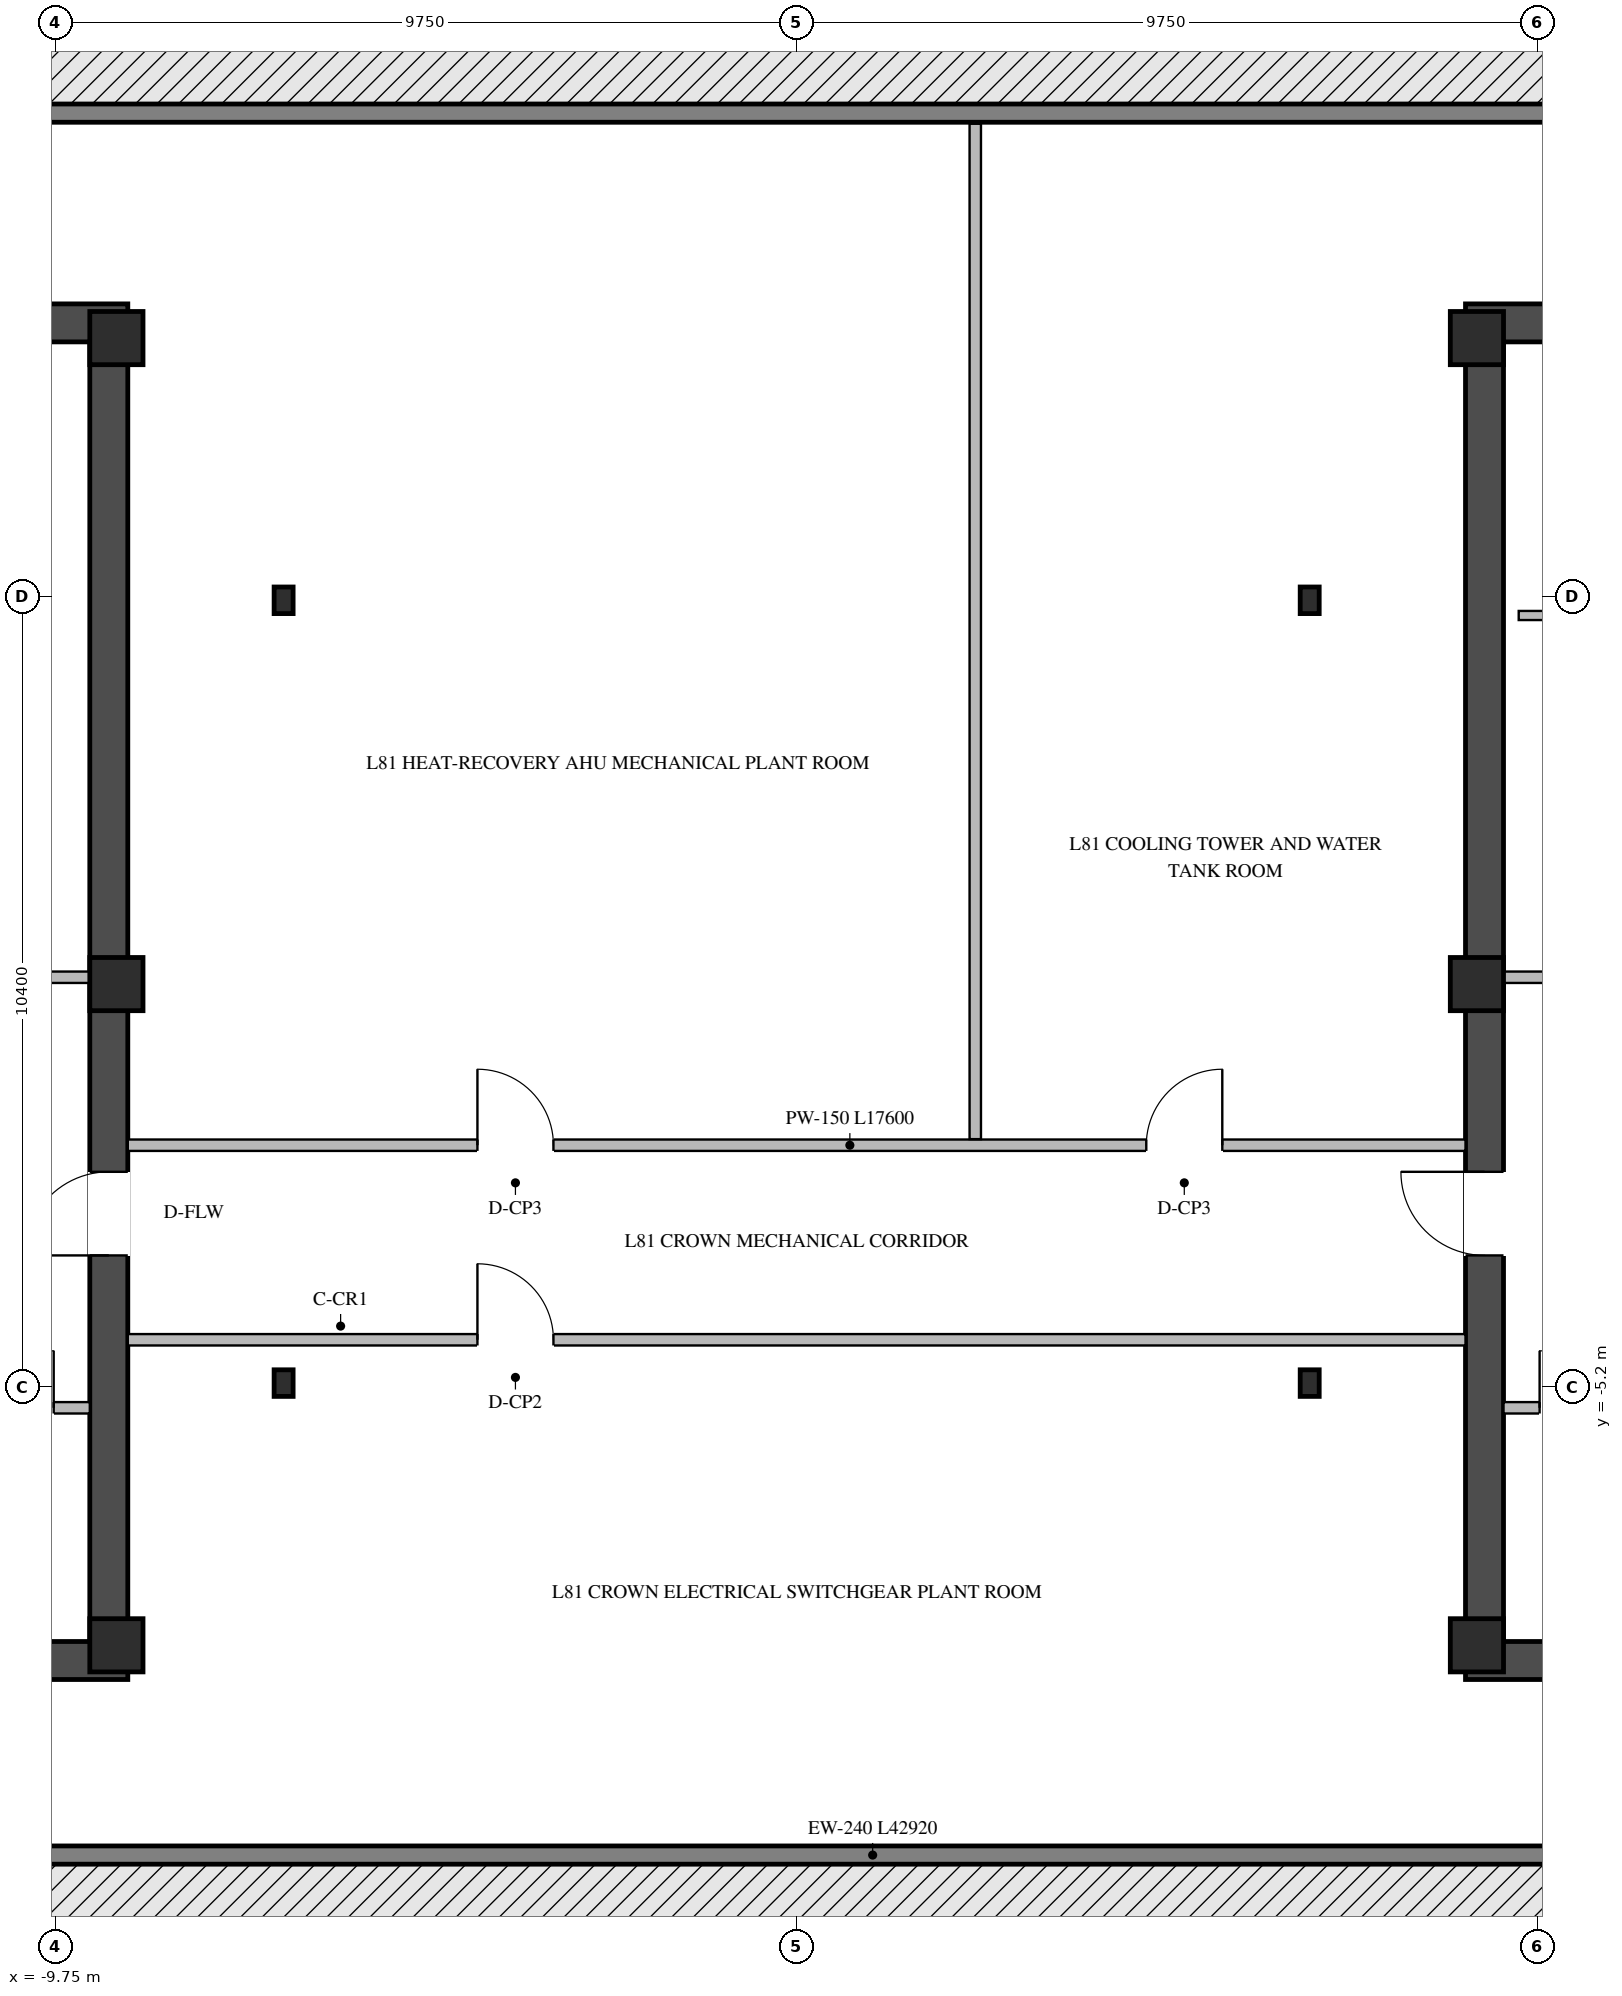
"""IFC4 building model, lengths in metres.
Left out: names, types, materials, properties, quantities, classifications, styles, units other than length and angle.
Written with IfcOpenShell. Run it as: python <this file> out.ifc"""

import sys

from ifc_helpers import new_model, si_unit, direction, frame, frame_2d, origin, origin_2d, place, context, subcontext, project, spatial, rectangle, i_section, extrude, element, fill, save


model = new_model("IFC4")
c1 = context("Model", 3, precision=1e-05, world=origin(), true_north=direction((0.0, 1.0)))
c2 = subcontext(c1, "Body", "Model", "MODEL_VIEW")
j1 = project(units=[si_unit("LENGTHUNIT", "METRE"), si_unit("PLANEANGLEUNIT", "RADIAN")], contexts=[c1])
p1 = place(None, origin())
s1 = spatial("IfcSite", under=j1, at=p1, CompositionType="ELEMENT")
p2 = place(p1, origin())
s2 = spatial("IfcBuilding", under=s1, at=p2, CompositionType="ELEMENT")
p3 = place(p2, frame((0.0, 0.0, 297.75)))
s3 = spatial("IfcBuildingStorey", under=s2, at=p3, CompositionType="ELEMENT", Elevation=297.75)
for number, where, z_axis, x_axis in (
    (1, (-19.05, -8.8, 0.0), (0.0, 0.0, 1.0), (1.0, 0.0, 0.0)),
    (2, (-19.05, 8.8, 0.0), (0.0, 0.0, 1.0), (1.0, 0.0, 0.0)),
):
    element("IfcWall", number, at=place(p3, frame(where, z_axis=z_axis, x_axis=x_axis)), inside=s3, PredefinedType="SHEAR", context=c2, shape_type="SweptSolid", body=[
        extrude(rectangle(XDim=10.25, YDim=0.5, at=frame_2d((5.125, 0.0))), origin(), (0.0, 0.0, 1.0), 3.35),
    ])
p4 = place(p3, frame((-9.05, -8.55, 0.0), z_axis=(0.0, 0.0, 1.0), x_axis=(0.0, 1.0, 0.0)))
e3 = element("IfcWall", 3, at=p4, inside=s3, PredefinedType="SHEAR", context=c2, shape_type="SweptSolid", body=[
    extrude(rectangle(XDim=17.1, YDim=0.5, at=frame_2d((8.55, 0.0))), origin(), (0.0, 0.0, 1.0), 3.35),
])
p5 = place(p4, frame((5.08, 0.0, 0.0)))
e4 = element("IfcOpeningElement", 4, at=p5, cuts=e3, PredefinedType="OPENING", context=c2, shape_type="SweptSolid", body=[
    extrude(rectangle(XDim=1.1, YDim=2.08, at=frame_2d((0.55, 1.04))), frame((0.0, 0.26, 0.0), z_axis=(0.0, -1.0, 0.0), x_axis=(1.0, 0.0, 0.0)), (0.0, 0.0, 1.0), 0.52),
])
for number, where, z_axis, x_axis in (
    (5, (8.8, -8.8, 0.0), (0.0, 0.0, 1.0), (1.0, 0.0, 0.0)),
    (6, (8.8, 8.8, 0.0), (0.0, 0.0, 1.0), (1.0, 0.0, 0.0)),
):
    element("IfcWall", number, at=place(p3, frame(where, z_axis=z_axis, x_axis=x_axis)), inside=s3, PredefinedType="SHEAR", context=c2, shape_type="SweptSolid", body=[
        extrude(rectangle(XDim=10.25, YDim=0.5, at=frame_2d((5.125, 0.0))), origin(), (0.0, 0.0, 1.0), 3.35),
    ])
p6 = place(p3, frame((9.05, -8.55, 0.0), z_axis=(0.0, 0.0, 1.0), x_axis=(0.0, 1.0, 0.0)))
e7 = element("IfcWall", 7, at=p6, inside=s3, PredefinedType="SHEAR", context=c2, shape_type="SweptSolid", body=[
    extrude(rectangle(XDim=17.1, YDim=0.5, at=frame_2d((8.55, 0.0))), origin(), (0.0, 0.0, 1.0), 3.35),
])
p7 = place(p6, frame((5.08, 0.0, 0.0)))
e8 = element("IfcOpeningElement", 8, at=p7, cuts=e7, PredefinedType="OPENING", context=c2, shape_type="SweptSolid", body=[
    extrude(rectangle(XDim=1.1, YDim=2.08, at=frame_2d((0.55, 1.04))), frame((0.0, 0.26, 0.0), z_axis=(0.0, -1.0, 0.0), x_axis=(1.0, 0.0, 0.0)), (0.0, 0.0, 1.0), 0.52),
])
for number, where, z_axis, x_axis in (
    (9, (-8.95, -8.6, 0.0), (0.0, 0.0, 1.0), (1.0, 0.0, 0.0)),
    (10, (-8.95, 0.1, 0.0), (0.0, 0.0, 1.0), (1.0, 0.0, 0.0)),
    (11, (-8.95, 8.6, 0.0), (0.0, 0.0, 1.0), (1.0, 0.0, 0.0)),
    (12, (8.95, -8.6, 0.0), (0.0, 0.0, 1.0), (1.0, 0.0, 0.0)),
    (13, (8.95, 0.1, 0.0), (0.0, 0.0, 1.0), (1.0, 0.0, 0.0)),
    (14, (8.95, 8.6, 0.0), (0.0, 0.0, 1.0), (1.0, 0.0, 0.0)),
):
    element("IfcColumn", number, at=place(p3, frame(where, z_axis=z_axis, x_axis=x_axis)), inside=s3, PredefinedType="COLUMN", context=c2, shape_type="SweptSolid", body=[
        extrude(rectangle(XDim=0.7, YDim=0.7, at=origin_2d()), origin(), (0.0, 0.0, 1.0), 3.6),
    ])
for number, where, z_axis, x_axis in (
    (15, (-6.75, -5.15, 0.0), (0.0, 0.0, 1.0), (1.0, 0.0, 0.0)),
    (16, (-6.75, 5.15, 0.0), (0.0, 0.0, 1.0), (1.0, 0.0, 0.0)),
    (17, (6.75, -5.15, 0.0), (0.0, 0.0, 1.0), (1.0, 0.0, 0.0)),
    (18, (6.75, 5.15, 0.0), (0.0, 0.0, 1.0), (1.0, 0.0, 0.0)),
):
    element("IfcColumn", number, at=place(p3, frame(where, z_axis=z_axis, x_axis=x_axis)), inside=s3, PredefinedType="COLUMN", context=c2, shape_type="SweptSolid", body=[
        extrude(i_section(OverallWidth=0.25, OverallDepth=0.35, WebThickness=0.01, FlangeThickness=0.012, at=origin_2d()), origin(), (0.0, 0.0, 1.0), 3.6),
    ])
for number, where, z_axis, x_axis in (
    (19, (-20.46, -11.36, 0.0), (0.0, 0.0, 1.0), (1.0, 0.0, 0.0)),
    (20, (22.46, 11.56, 0.0), (0.0, 0.0, 1.0), (-1.0, 0.0, 0.0)),
):
    element("IfcWall", number, at=place(p3, frame(where, z_axis=z_axis, x_axis=x_axis)), inside=s3, PredefinedType="STANDARD", context=c2, shape_type="SweptSolid", body=[
        extrude(rectangle(XDim=42.92, YDim=0.24, at=frame_2d((21.46, 0.0))), origin(), (0.0, 0.0, 1.0), 3.33),
    ])
p8 = place(p3, frame((-12.895, -5.475, 0.0), z_axis=(0.0, 0.0, 1.0), x_axis=(1.0, 0.0, 0.0)))
e21 = element("IfcWall", 21, at=p8, inside=s3, PredefinedType="STANDARD", context=c2, shape_type="SweptSolid", body=[
    extrude(rectangle(XDim=3.595, YDim=0.15, at=frame_2d((1.797, 0.0))), origin(), (0.0, 0.0, 1.0), 3.33),
])
p9 = place(p8, frame((0.42, 0.0, 0.0)))
e22 = element("IfcOpeningElement", 22, at=p9, cuts=e21, PredefinedType="OPENING", context=c2, shape_type="SweptSolid", body=[
    extrude(rectangle(XDim=1.1, YDim=2.15, at=frame_2d((0.55, 1.075))), frame((0.0, 0.085, 0.0), z_axis=(0.0, -1.0, 0.0), x_axis=(1.0, 0.0, 0.0)), (0.0, 0.0, 1.0), 0.17),
])
p10 = place(p8, frame((2.37, 0.0, 0.0)))
e23 = element("IfcOpeningElement", 23, at=p10, cuts=e21, PredefinedType="OPENING", context=c2, shape_type="SweptSolid", body=[
    extrude(rectangle(XDim=0.75, YDim=2.05, at=frame_2d((0.375, 1.025))), frame((0.0, 0.085, 0.0), z_axis=(0.0, -1.0, 0.0), x_axis=(1.0, 0.0, 0.0)), (0.0, 0.0, 1.0), 0.17),
])
p11 = place(p3, frame((-12.89, 0.19, 0.0), z_axis=(0.0, 0.0, 1.0), x_axis=(1.0, 0.0, 0.0)))
e24 = element("IfcWall", 24, at=p11, inside=s3, PredefinedType="STANDARD", context=c2, shape_type="SweptSolid", body=[
    extrude(rectangle(XDim=3.59, YDim=0.15, at=frame_2d((1.795, 0.0))), origin(), (0.0, 0.0, 1.0), 2.825),
])
p12 = place(p11, frame((0.415, 0.0, 0.0)))
e25 = element("IfcOpeningElement", 25, at=p12, cuts=e24, PredefinedType="OPENING", context=c2, shape_type="SweptSolid", body=[
    extrude(rectangle(XDim=0.85, YDim=2.04, at=frame_2d((0.425, 1.02))), frame((0.0, 0.085, 0.0), z_axis=(0.0, -1.0, 0.0), x_axis=(1.0, 0.0, 0.0)), (0.0, 0.0, 1.0), 0.17),
])
p13 = place(p3, frame((9.3, -5.475, 0.0), z_axis=(0.0, 0.0, 1.0), x_axis=(1.0, 0.0, 0.0)))
e26 = element("IfcWall", 26, at=p13, inside=s3, PredefinedType="STANDARD", context=c2, shape_type="SweptSolid", body=[
    extrude(rectangle(XDim=3.595, YDim=0.15, at=frame_2d((1.797, 0.0))), origin(), (0.0, 0.0, 1.0), 3.33),
])
p14 = place(p13, frame((2.075, 0.0, 0.0)))
e27 = element("IfcOpeningElement", 27, at=p14, cuts=e26, PredefinedType="OPENING", context=c2, shape_type="SweptSolid", body=[
    extrude(rectangle(XDim=1.1, YDim=2.15, at=frame_2d((0.55, 1.075))), frame((0.0, 0.085, 0.0), z_axis=(0.0, -1.0, 0.0), x_axis=(1.0, 0.0, 0.0)), (0.0, 0.0, 1.0), 0.17),
])
p15 = place(p13, frame((0.475, 0.0, 0.0)))
e28 = element("IfcOpeningElement", 28, at=p15, cuts=e26, PredefinedType="OPENING", context=c2, shape_type="SweptSolid", body=[
    extrude(rectangle(XDim=0.75, YDim=2.05, at=frame_2d((0.375, 1.025))), frame((0.0, 0.085, 0.0), z_axis=(0.0, -1.0, 0.0), x_axis=(1.0, 0.0, 0.0)), (0.0, 0.0, 1.0), 0.17),
])
p16 = place(p3, frame((9.3, 0.19, 0.0), z_axis=(0.0, 0.0, 1.0), x_axis=(1.0, 0.0, 0.0)))
e29 = element("IfcWall", 29, at=p16, inside=s3, PredefinedType="STANDARD", context=c2, shape_type="SweptSolid", body=[
    extrude(rectangle(XDim=3.59, YDim=0.15, at=frame_2d((1.795, 0.0))), origin(), (0.0, 0.0, 1.0), 2.825),
])
p17 = place(p16, frame((2.325, 0.0, 0.0)))
e30 = element("IfcOpeningElement", 30, at=p17, cuts=e29, PredefinedType="OPENING", context=c2, shape_type="SweptSolid", body=[
    extrude(rectangle(XDim=0.85, YDim=2.04, at=frame_2d((0.425, 1.02))), frame((0.0, 0.085, 0.0), z_axis=(0.0, -1.0, 0.0), x_axis=(1.0, 0.0, 0.0)), (0.0, 0.0, 1.0), 0.17),
])
p18 = place(p3, frame((9.5, 4.95, 0.0), z_axis=(0.0, 0.0, 1.0), x_axis=(1.0, 0.0, 0.0)))
e31 = element("IfcWall", 31, at=p18, inside=s3, PredefinedType="STANDARD", context=c2, shape_type="SweptSolid", body=[
    extrude(rectangle(XDim=1.55, YDim=0.12, at=frame_2d((0.775, 0.0))), origin(), (0.0, 0.0, 1.0), 3.33),
])
p19 = place(p3, frame((-8.8, -2.02, 0.0), z_axis=(0.0, 0.0, 1.0), x_axis=(1.0, 0.0, 0.0)))
e32 = element("IfcWall", 32, at=p19, inside=s3, PredefinedType="STANDARD", context=c2, shape_type="SweptSolid", body=[
    extrude(rectangle(XDim=17.6, YDim=0.15, at=frame_2d((8.8, 0.0))), origin(), (0.0, 0.0, 1.0), 3.33),
])
p20 = place(p19, frame((4.6, 0.0, 0.0)))
e33 = element("IfcOpeningElement", 33, at=p20, cuts=e32, PredefinedType="OPENING", context=c2, shape_type="SweptSolid", body=[
    extrude(rectangle(XDim=1.0, YDim=2.02, at=frame_2d((0.5, 1.01))), frame((0.0, 0.085, 0.0), z_axis=(0.0, -1.0, 0.0), x_axis=(1.0, 0.0, 0.0)), (0.0, 0.0, 1.0), 0.17),
])
p21 = place(p19, frame((13.4, 0.0, 0.0)))
e34 = element("IfcOpeningElement", 34, at=p21, cuts=e32, PredefinedType="OPENING", context=c2, shape_type="SweptSolid", body=[
    extrude(rectangle(XDim=1.0, YDim=2.02, at=frame_2d((0.5, 1.01))), frame((0.0, 0.085, 0.0), z_axis=(0.0, -1.0, 0.0), x_axis=(1.0, 0.0, 0.0)), (0.0, 0.0, 1.0), 0.17),
])
p22 = place(p3, frame((2.35, -1.94, 0.0), z_axis=(0.0, 0.0, 1.0), x_axis=(0.0, 1.0, 0.0)))
e35 = element("IfcWall", 35, at=p22, inside=s3, PredefinedType="STANDARD", context=c2, shape_type="SweptSolid", body=[
    extrude(rectangle(XDim=13.36, YDim=0.15, at=frame_2d((6.68, 0.0))), origin(), (0.0, 0.0, 1.0), 3.33),
])
p23 = place(p3, frame((-8.8, -4.58, 0.0), z_axis=(0.0, 0.0, 1.0), x_axis=(1.0, 0.0, 0.0)))
e36 = element("IfcWall", 36, at=p23, inside=s3, PredefinedType="STANDARD", context=c2, shape_type="SweptSolid", body=[
    extrude(rectangle(XDim=17.6, YDim=0.15, at=frame_2d((8.8, 0.0))), origin(), (0.0, 0.0, 1.0), 3.33),
])
p24 = place(p23, frame((4.6, 0.0, 0.0)))
e37 = element("IfcOpeningElement", 37, at=p24, cuts=e36, PredefinedType="OPENING", context=c2, shape_type="SweptSolid", body=[
    extrude(rectangle(XDim=1.0, YDim=2.02, at=frame_2d((0.5, 1.01))), frame((0.0, 0.085, 0.0), z_axis=(0.0, -1.0, 0.0), x_axis=(1.0, 0.0, 0.0)), (0.0, 0.0, 1.0), 0.17),
])
p25 = place(p10, origin())
e38 = element("IfcDoor", 38, at=p25, inside=s3, OperationType="SINGLE_SWING_RIGHT", PredefinedType="DOOR", context=c2, shape_type="SweptSolid", body=[
    extrude(rectangle(XDim=0.75, YDim=2.05, at=frame_2d((0.375, 1.025))), frame((0.0, 0.025, 0.0), z_axis=(0.0, -1.0, 0.0), x_axis=(1.0, 0.0, 0.0)), (0.0, 0.0, 1.0), 0.05),
])
fill(e23, e38)
p26 = place(p5, origin())
e39 = element("IfcDoor", 39, at=p26, inside=s3, OperationType="SINGLE_SWING_LEFT", PredefinedType="DOOR", context=c2, shape_type="SweptSolid", body=[
    extrude(rectangle(XDim=1.1, YDim=2.08, at=frame_2d((0.55, 1.04))), frame((0.0, 0.205, 0.0), z_axis=(0.0, -1.0, 0.0), x_axis=(1.0, 0.0, 0.0)), (0.0, 0.0, 1.0), 0.05),
])
fill(e4, e39)
p27 = place(p15, origin())
e40 = element("IfcDoor", 40, at=p27, inside=s3, OperationType="SINGLE_SWING_LEFT", PredefinedType="DOOR", context=c2, shape_type="SweptSolid", body=[
    extrude(rectangle(XDim=0.75, YDim=2.05, at=frame_2d((0.375, 1.025))), frame((0.0, 0.025, 0.0), z_axis=(0.0, -1.0, 0.0), x_axis=(1.0, 0.0, 0.0)), (0.0, 0.0, 1.0), 0.05),
])
fill(e28, e40)
p28 = place(p7, origin())
e41 = element("IfcDoor", 41, at=p28, inside=s3, OperationType="SINGLE_SWING_RIGHT", PredefinedType="DOOR", context=c2, shape_type="SweptSolid", body=[
    extrude(rectangle(XDim=1.1, YDim=2.08, at=frame_2d((0.55, 1.04))), frame((0.0, -0.155, 0.0), z_axis=(0.0, -1.0, 0.0), x_axis=(1.0, 0.0, 0.0)), (0.0, 0.0, 1.0), 0.05),
])
fill(e8, e41)
p29 = place(p20, origin())
e42 = element("IfcDoor", 42, at=p29, inside=s3, OperationType="SINGLE_SWING_LEFT", PredefinedType="DOOR", context=c2, shape_type="SweptSolid", body=[
    extrude(rectangle(XDim=1.0, YDim=2.02, at=frame_2d((0.5, 1.01))), frame((0.0, 0.025, 0.0), z_axis=(0.0, -1.0, 0.0), x_axis=(1.0, 0.0, 0.0)), (0.0, 0.0, 1.0), 0.05),
])
fill(e33, e42)
p30 = place(p21, origin())
e43 = element("IfcDoor", 43, at=p30, inside=s3, OperationType="SINGLE_SWING_RIGHT", PredefinedType="DOOR", context=c2, shape_type="SweptSolid", body=[
    extrude(rectangle(XDim=1.0, YDim=2.02, at=frame_2d((0.5, 1.01))), frame((0.0, 0.025, 0.0), z_axis=(0.0, -1.0, 0.0), x_axis=(1.0, 0.0, 0.0)), (0.0, 0.0, 1.0), 0.05),
])
fill(e34, e43)
p31 = place(p24, origin())
e44 = element("IfcDoor", 44, at=p31, inside=s3, OperationType="SINGLE_SWING_LEFT", PredefinedType="DOOR", context=c2, shape_type="SweptSolid", body=[
    extrude(rectangle(XDim=1.0, YDim=2.02, at=frame_2d((0.5, 1.01))), frame((0.0, 0.025, 0.0), z_axis=(0.0, -1.0, 0.0), x_axis=(1.0, 0.0, 0.0)), (0.0, 0.0, 1.0), 0.05),
])
fill(e37, e44)
save(model, sys.argv[1])
